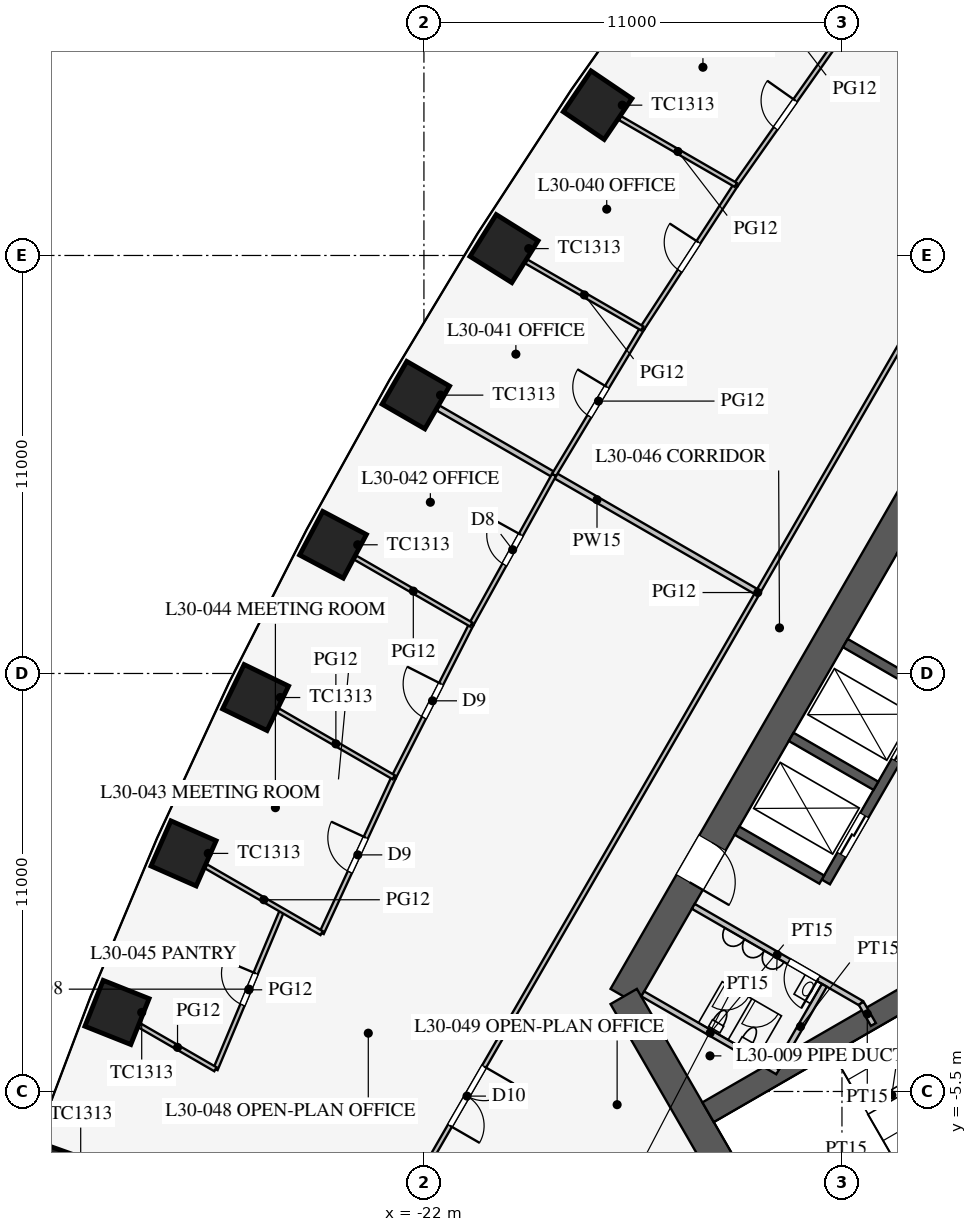
"""IFC4 building model, lengths in metres.
Left out: names, types, materials, properties, quantities, classifications, styles, units other than length and angle.
Written with IfcOpenShell. Run it as: python <this file> out.ifc"""

import sys

from ifc_helpers import new_model, si_unit, direction, frame, frame_2d, origin, origin_2d, place, context, subcontext, project, spatial, rectangle, extrude, element, fill, save


model = new_model("IFC4")
c1 = context("Model", 3, precision=1e-05, world=origin(), true_north=direction((0.0, 1.0)))
c2 = subcontext(c1, "Body", "Model", "MODEL_VIEW")
j1 = project(units=[si_unit("LENGTHUNIT", "METRE"), si_unit("PLANEANGLEUNIT", "RADIAN")], contexts=[c1])
p1 = place(None, origin())
s1 = spatial("IfcSite", under=j1, at=p1, CompositionType="ELEMENT")
p2 = place(p1, origin())
s2 = spatial("IfcBuilding", under=s1, at=p2, CompositionType="ELEMENT")
p3 = place(p2, frame((0.0, 0.0, 132.5)))
s3 = spatial("IfcBuildingStorey", under=s2, at=p3, CompositionType="ELEMENT", Elevation=132.5)
for number, where, z_axis, x_axis in (
    (1, (-17.43, 20.456, 0.0), (0.0, 0.0, 1.0), (-0.561, -0.828, 0.0)),
    (2, (-19.893, 16.681, 0.0), (0.0, 0.0, 1.0), (-0.531, -0.847, 0.0)),
    (3, (-22.213, 12.825, 0.0), (0.0, 0.0, 1.0), (-0.5, -0.866, 0.0)),
    (4, (-24.393, 8.887, 0.0), (0.0, 0.0, 1.0), (-0.468, -0.883, 0.0)),
    (5, (-26.43, 4.867, 0.0), (0.0, 0.0, 1.0), (-0.436, -0.9, 0.0)),
    (6, (-28.325, 0.765, 0.0), (0.0, 0.0, 1.0), (-0.403, -0.915, 0.0)),
    (7, (-30.077, -3.42, 0.0), (0.0, 0.0, 1.0), (-0.37, -0.929, 0.0)),
    (8, (-31.682, -7.689, 0.0), (0.0, 0.0, 1.0), (-0.336, -0.942, 0.0)),
):
    element("IfcColumn", number, at=place(p3, frame(where, z_axis=z_axis, x_axis=x_axis)), inside=s3, PredefinedType="COLUMN", context=c2, shape_type="SweptSolid", body=[
        extrude(rectangle(XDim=1.3, YDim=1.3, at=origin_2d()), origin(), (0.0, 0.0, 1.0), 4.2),
    ])
p4 = place(p3, frame((-5.773, 16.0, 0.0), z_axis=(0.0, 0.0, 1.0), x_axis=(-0.500002442456, -0.866023993627, 0.0)))
e9 = element("IfcWall", 9, at=p4, inside=s3, PredefinedType="SHEAR", context=c2, shape_type="SweptSolid", body=[
    extrude(rectangle(XDim=21.939, YDim=0.8, at=frame_2d((10.97, 0.0))), origin(), (0.0, 0.0, 1.0), 4.2),
])
p5 = place(p4, frame((17.27, 0.0, 0.0)))
e10 = element("IfcOpeningElement", 10, at=p5, cuts=e9, PredefinedType="OPENING", context=c2, shape_type="SweptSolid", body=[
    extrude(rectangle(XDim=1.2, YDim=2.1, at=frame_2d((0.6, 1.05))), frame((0.0, 0.41, 0.0), z_axis=(0.0, -1.0, 0.0), x_axis=(1.0, 0.0, 0.0)), (0.0, 0.0, 1.0), 0.82),
])
p6 = place(p4, frame((3.47, 0.0, 0.0)))
e11 = element("IfcOpeningElement", 11, at=p6, cuts=e9, PredefinedType="OPENING", context=c2, shape_type="SweptSolid", body=[
    extrude(rectangle(XDim=1.2, YDim=2.1, at=frame_2d((0.6, 1.05))), frame((0.0, 0.41, 0.0), z_axis=(0.0, -1.0, 0.0), x_axis=(1.0, 0.0, 0.0)), (0.0, 0.0, 1.0), 0.82),
])
p7 = place(p3, frame((-16.743, -3.0, 0.0), z_axis=(0.0, 0.0, 1.0), x_axis=(0.499995765644, -0.866027848477, 0.0)))
e12 = element("IfcWall", 12, at=p7, inside=s3, PredefinedType="SHEAR", context=c2, shape_type="SweptSolid", body=[
    extrude(rectangle(XDim=11.547, YDim=0.8, at=frame_2d((5.773, 0.0))), origin(), (0.0, 0.0, 1.0), 4.2),
])
p8 = place(p3, frame((-5.724, 9.886, 0.0), z_axis=(0.0, 0.0, 1.0), x_axis=(-0.500001763848, -0.866024385424, 0.0)))
e13 = element("IfcWall", 13, at=p8, inside=s3, PredefinedType="SHEAR", context=c2, shape_type="SweptSolid", body=[
    extrude(rectangle(XDim=11.4, YDim=0.25, at=frame_2d((5.7, 0.0))), origin(), (0.0, 0.0, 1.0), 4.2),
])
p9 = place(p8, frame((6.525, 0.0, 0.0)))
e14 = element("IfcOpeningElement", 14, at=p9, cuts=e13, PredefinedType="OPENING", context=c2, shape_type="SweptSolid", body=[
    extrude(rectangle(XDim=1.2, YDim=2.2, at=frame_2d((0.6, 1.1))), frame((0.0, 0.135, 0.0), z_axis=(0.0, -1.0, 0.0), x_axis=(1.0, 0.0, 0.0)), (0.0, 0.0, 1.0), 0.27),
])
p10 = place(p8, frame((9.375, 0.0, 0.0)))
e15 = element("IfcOpeningElement", 15, at=p10, cuts=e13, PredefinedType="OPENING", context=c2, shape_type="SweptSolid", body=[
    extrude(rectangle(XDim=1.2, YDim=2.2, at=frame_2d((0.6, 1.1))), frame((0.0, 0.135, 0.0), z_axis=(0.0, -1.0, 0.0), x_axis=(1.0, 0.0, 0.0)), (0.0, 0.0, 1.0), 0.27),
])
for number, where, z_axis, x_axis in (
    (16, (-7.257, 7.481, 0.0), (0.0, 0.0, 1.0), (-0.866, 0.5, 0.0)),
    (17, (-8.682, 5.012, 0.0), (0.0, 0.0, 1.0), (-0.866, 0.5, 0.0)),
    (18, (-10.107, 2.544, 0.0), (0.0, 0.0, 1.0), (-0.866, 0.5, 0.0)),
    (19, (-11.532, 0.076, 0.0), (0.0, 0.0, 1.0), (-0.866, 0.5, 0.0)),
):
    element("IfcWall", number, at=place(p3, frame(where, z_axis=z_axis, x_axis=x_axis)), inside=s3, PredefinedType="SHEAR", context=c2, shape_type="SweptSolid", body=[
        extrude(rectangle(XDim=2.575, YDim=0.25, at=frame_2d((1.288, 0.0))), origin(), (0.0, 0.0, 1.0), 4.2),
    ])
for number, where, z_axis, x_axis in (
    (20, (-6.663, -1.509, 0.0), (0.0, 0.0, 1.0), (-0.866, -0.5, 0.0)),
    (21, (-4.638, -5.016, 0.0), (0.0, 0.0, 1.0), (-0.866, -0.5, 0.0)),
):
    element("IfcWall", number, at=place(p3, frame(where, z_axis=z_axis, x_axis=x_axis)), inside=s3, PredefinedType="SHEAR", context=c2, shape_type="SweptSolid", body=[
        extrude(rectangle(XDim=9.075, YDim=0.6, at=frame_2d((4.538, 0.0))), origin(), (0.0, 0.0, 1.0), 4.2),
    ])
p11 = place(p3, frame((-10.495, -3.178, 0.0), z_axis=(0.0, 0.0, 1.0), x_axis=(-0.86602216432, 0.500005610874, 0.0)))
e22 = element("IfcWall", 22, at=p11, inside=s3, PredefinedType="PARTITIONING", context=c2, shape_type="SweptSolid", body=[
    extrude(rectangle(XDim=5.1, YDim=0.15, at=frame_2d((2.55, 0.0))), origin(), (0.0, 0.0, 1.0), 4.0),
])
p12 = place(p11, frame((1.3, 0.0, 0.0)))
e23 = element("IfcOpeningElement", 23, at=p12, cuts=e22, PredefinedType="OPENING", context=c2, shape_type="SweptSolid", body=[
    extrude(rectangle(XDim=0.9, YDim=2.1, at=frame_2d((0.45, 1.05))), frame((0.0, 0.085, 0.0), z_axis=(0.0, -1.0, 0.0), x_axis=(1.0, 0.0, 0.0)), (0.0, 0.0, 1.0), 0.17),
])
p13 = place(p3, frame((-10.495, -3.178, 0.0), z_axis=(0.0, 0.0, 1.0), x_axis=(0.499842556608, -0.866116284689, 0.0)))
e24 = element("IfcWall", 24, at=p13, inside=s3, PredefinedType="PARTITIONING", context=c2, shape_type="SweptSolid", body=[
    extrude(rectangle(XDim=0.645, YDim=0.15, at=frame_2d((0.323, 0.0))), origin(), (0.0, 0.0, 1.0), 4.0),
])
p14 = place(p3, frame((-12.691, -4.982, 0.0), z_axis=(0.0, 0.0, 1.0), x_axis=(-0.8660249478, 0.500000789788, 0.0)))
e25 = element("IfcWall", 25, at=p14, inside=s3, PredefinedType="PARTITIONING", context=c2, shape_type="SweptSolid", body=[
    extrude(rectangle(XDim=4.1, YDim=0.15, at=frame_2d((2.05, 0.0))), origin(), (0.0, 0.0, 1.0), 4.0),
])
p15 = place(p3, frame((-11.464, -2.706, 0.0), z_axis=(0.0, 0.0, 1.0), x_axis=(-0.50001992892, -0.866013897511, 0.0)))
e26 = element("IfcWall", 26, at=p15, inside=s3, PredefinedType="PARTITIONING", context=c2, shape_type="SweptSolid", body=[
    extrude(rectangle(XDim=2.51, YDim=0.15, at=frame_2d((1.255, 0.0))), origin(), (0.0, 0.0, 1.0), 4.0),
])
p16 = place(p3, frame((-13.268, 7.66, 0.0), z_axis=(0.0, 0.0, 1.0), x_axis=(-0.866015788683, 0.500016653474, 0.0)))
e27 = element("IfcWall", 27, at=p16, inside=s3, PredefinedType="PARTITIONING", context=c2, shape_type="SweptSolid", body=[
    extrude(rectangle(XDim=9.65, YDim=0.15, at=frame_2d((4.825, 0.0))), origin(), (0.0, 0.0, 1.0), 3.2),
])
p17 = place(p3, frame((-0.016, 30.491, 0.0), z_axis=(0.0, 0.0, 1.0), x_axis=(-0.50000091641, -0.866024874695, 0.0)))
e28 = element("IfcWall", 28, at=p17, inside=s3, PredefinedType="PARTITIONING", context=c2, shape_type="SweptSolid", body=[
    extrude(rectangle(XDim=52.796, YDim=0.12, at=frame_2d((26.398, 0.0))), origin(), (0.0, 0.0, 1.0), 2.9),
])
p18 = place(p17, frame((10.2, 0.0, 0.15)))
e29 = element("IfcOpeningElement", 29, at=p18, cuts=e28, PredefinedType="OPENING", context=c2, shape_type="SweptSolid", body=[
    extrude(rectangle(XDim=1.8, YDim=2.1, at=frame_2d((0.9, 1.05))), frame((0.0, 0.07, 0.0), z_axis=(0.0, -1.0, 0.0), x_axis=(1.0, 0.0, 0.0)), (0.0, 0.0, 1.0), 0.14),
])
p19 = place(p17, frame((40.8, 0.0, 0.15)))
e30 = element("IfcOpeningElement", 30, at=p19, cuts=e28, PredefinedType="OPENING", context=c2, shape_type="SweptSolid", body=[
    extrude(rectangle(XDim=1.8, YDim=2.1, at=frame_2d((0.9, 1.05))), frame((0.0, 0.07, 0.0), z_axis=(0.0, -1.0, 0.0), x_axis=(1.0, 0.0, 0.0)), (0.0, 0.0, 1.0), 0.14),
])
p20 = place(p3, frame((-18.576, 10.725, 0.0), z_axis=(0.0, 0.0, 1.0), x_axis=(-0.484292898211, -0.874905931368, 0.0)))
e31 = element("IfcWall", 31, at=p20, inside=s3, PredefinedType="PARTITIONING", context=c2, shape_type="SweptSolid", body=[
    extrude(rectangle(XDim=4.501, YDim=0.12, at=frame_2d((2.25, 0.0))), origin(), (0.0, 0.0, 1.0), 2.9),
])
p21 = place(p20, frame((1.8, 0.0, 0.15)))
e32 = element("IfcOpeningElement", 32, at=p21, cuts=e31, PredefinedType="OPENING", context=c2, shape_type="SweptSolid", body=[
    extrude(rectangle(XDim=0.9, YDim=2.1, at=frame_2d((0.45, 1.05))), frame((0.0, 0.07, 0.0), z_axis=(0.0, -1.0, 0.0), x_axis=(1.0, 0.0, 0.0)), (0.0, 0.0, 1.0), 0.14),
])
p22 = place(p3, frame((-25.731, -0.732, 0.0), z_axis=(0.0, 0.0, 1.0), x_axis=(-0.386742917128, -0.92218757097, 0.0)))
e33 = element("IfcWall", 33, at=p22, inside=s3, PredefinedType="PARTITIONING", context=c2, shape_type="SweptSolid", body=[
    extrude(rectangle(XDim=4.536, YDim=0.12, at=frame_2d((2.268, 0.0))), origin(), (0.0, 0.0, 1.0), 2.9),
])
p23 = place(p22, frame((1.8, 0.0, 0.15)))
e34 = element("IfcOpeningElement", 34, at=p23, cuts=e33, PredefinedType="OPENING", context=c2, shape_type="SweptSolid", body=[
    extrude(rectangle(XDim=0.9, YDim=2.1, at=frame_2d((0.45, 1.05))), frame((0.0, 0.07, 0.0), z_axis=(0.0, -1.0, 0.0), x_axis=(1.0, 0.0, 0.0)), (0.0, 0.0, 1.0), 0.14),
])
p24 = place(p3, frame((-20.756, 6.787, 0.0), z_axis=(0.0, 0.0, 1.0), x_axis=(-0.452471679136, -0.891778772779, 0.0)))
e35 = element("IfcWall", 35, at=p24, inside=s3, PredefinedType="PARTITIONING", context=c2, shape_type="SweptSolid", body=[
    extrude(rectangle(XDim=4.507, YDim=0.12, at=frame_2d((2.253, 0.0))), origin(), (0.0, 0.0, 1.0), 2.9),
])
p25 = place(p24, frame((1.75, 0.0, 0.15)))
e36 = element("IfcOpeningElement", 36, at=p25, cuts=e35, PredefinedType="OPENING", context=c2, shape_type="SweptSolid", body=[
    extrude(rectangle(XDim=1.0, YDim=2.1, at=frame_2d((0.5, 1.05))), frame((0.0, 0.07, 0.0), z_axis=(0.0, -1.0, 0.0), x_axis=(1.0, 0.0, 0.0)), (0.0, 0.0, 1.0), 0.14),
])
p26 = place(p3, frame((-22.795, 2.768, 0.0), z_axis=(0.0, 0.0, 1.0), x_axis=(-0.41992827805, -0.90755729367, 0.0)))
e37 = element("IfcWall", 37, at=p26, inside=s3, PredefinedType="PARTITIONING", context=c2, shape_type="SweptSolid", body=[
    extrude(rectangle(XDim=4.519, YDim=0.12, at=frame_2d((2.259, 0.0))), origin(), (0.0, 0.0, 1.0), 2.9),
])
p27 = place(p26, frame((1.75, 0.0, 0.15)))
e38 = element("IfcOpeningElement", 38, at=p27, cuts=e37, PredefinedType="OPENING", context=c2, shape_type="SweptSolid", body=[
    extrude(rectangle(XDim=1.0, YDim=2.1, at=frame_2d((0.5, 1.05))), frame((0.0, 0.07, 0.0), z_axis=(0.0, -1.0, 0.0), x_axis=(1.0, 0.0, 0.0)), (0.0, 0.0, 1.0), 0.14),
])
p28 = place(p3, frame((-11.192, 22.05, 0.0), z_axis=(0.0, 0.0, 1.0), x_axis=(-0.575987178736, -0.817458726745, 0.0)))
e39 = element("IfcWall", 39, at=p28, inside=s3, PredefinedType="PARTITIONING", context=c2, shape_type="SweptSolid", body=[
    extrude(rectangle(XDim=4.518, YDim=0.12, at=frame_2d((2.259, 0.0))), origin(), (0.0, 0.0, 1.0), 2.9),
])
p29 = place(p28, frame((1.8, 0.0, 0.15)))
e40 = element("IfcOpeningElement", 40, at=p29, cuts=e39, PredefinedType="OPENING", context=c2, shape_type="SweptSolid", body=[
    extrude(rectangle(XDim=0.9, YDim=2.1, at=frame_2d((0.45, 1.05))), frame((0.0, 0.07, 0.0), z_axis=(0.0, -1.0, 0.0), x_axis=(1.0, 0.0, 0.0)), (0.0, 0.0, 1.0), 0.14),
])
p30 = place(p3, frame((-16.256, 14.581, 0.0), z_axis=(0.0, 0.0, 1.0), x_axis=(-0.515548366618, -0.856860479703, 0.0)))
e41 = element("IfcWall", 41, at=p30, inside=s3, PredefinedType="PARTITIONING", context=c2, shape_type="SweptSolid", body=[
    extrude(rectangle(XDim=4.501, YDim=0.12, at=frame_2d((2.25, 0.0))), origin(), (0.0, 0.0, 1.0), 2.9),
])
p31 = place(p30, frame((1.8, 0.0, 0.15)))
e42 = element("IfcOpeningElement", 42, at=p31, cuts=e41, PredefinedType="OPENING", context=c2, shape_type="SweptSolid", body=[
    extrude(rectangle(XDim=0.9, YDim=2.1, at=frame_2d((0.45, 1.05))), frame((0.0, 0.07, 0.0), z_axis=(0.0, -1.0, 0.0), x_axis=(1.0, 0.0, 0.0)), (0.0, 0.0, 1.0), 0.14),
])
p32 = place(p3, frame((-13.795, 18.357, 0.0), z_axis=(0.0, 0.0, 1.0), x_axis=(-0.546069464151, -0.837739900161, 0.0)))
e43 = element("IfcWall", 43, at=p32, inside=s3, PredefinedType="PARTITIONING", context=c2, shape_type="SweptSolid", body=[
    extrude(rectangle(XDim=4.507, YDim=0.12, at=frame_2d((2.253, 0.0))), origin(), (0.0, 0.0, 1.0), 2.9),
])
p33 = place(p32, frame((1.8, 0.0, 0.15)))
e44 = element("IfcOpeningElement", 44, at=p33, cuts=e43, PredefinedType="OPENING", context=c2, shape_type="SweptSolid", body=[
    extrude(rectangle(XDim=0.9, YDim=2.1, at=frame_2d((0.45, 1.05))), frame((0.0, 0.07, 0.0), z_axis=(0.0, -1.0, 0.0), x_axis=(1.0, 0.0, 0.0)), (0.0, 0.0, 1.0), 0.14),
])
p34 = place(p3, frame((-24.692, -1.333, 0.0), z_axis=(0.0, 0.0, 1.0), x_axis=(-0.86600959659, 0.500027377864, 0.0)))
e45 = element("IfcWall", 45, at=p34, inside=s3, PredefinedType="PARTITIONING", context=c2, shape_type="SweptSolid", body=[
    extrude(rectangle(XDim=3.511, YDim=0.12, at=frame_2d((1.756, 0.0))), origin(), (0.0, 0.0, 1.0), 2.9),
])
p35 = place(p3, frame((-27.486, -4.916, 0.0), z_axis=(0.0, 0.0, 1.0), x_axis=(-0.865991504495, 0.500058710695, 0.0)))
e46 = element("IfcWall", 46, at=p35, inside=s3, PredefinedType="PARTITIONING", context=c2, shape_type="SweptSolid", body=[
    extrude(rectangle(XDim=2.304, YDim=0.12, at=frame_2d((1.152, 0.0))), origin(), (0.0, 0.0, 1.0), 2.9),
])
p36 = place(p3, frame((-20.756, 6.787, 0.0), z_axis=(0.0, 0.0, 1.0), x_axis=(-0.866027308682, 0.499996700606, 0.0)))
e47 = element("IfcWall", 47, at=p36, inside=s3, PredefinedType="PARTITIONING", context=c2, shape_type="SweptSolid", body=[
    extrude(rectangle(XDim=3.519, YDim=0.12, at=frame_2d((1.76, 0.0))), origin(), (0.0, 0.0, 1.0), 2.9),
])
p37 = place(p3, frame((-22.795, 2.768, 0.0), z_axis=(0.0, 0.0, 1.0), x_axis=(-0.866034119795, 0.499984903122, 0.0)))
e48 = element("IfcWall", 48, at=p37, inside=s3, PredefinedType="PARTITIONING", context=c2, shape_type="SweptSolid", body=[
    extrude(rectangle(XDim=3.516, YDim=0.12, at=frame_2d((1.758, 0.0))), origin(), (0.0, 0.0, 1.0), 2.9),
])
p38 = place(p3, frame((-16.256, 14.581, 0.0), z_axis=(0.0, 0.0, 1.0), x_axis=(-0.866027308682, 0.499996700606, 0.0)))
e49 = element("IfcWall", 49, at=p38, inside=s3, PredefinedType="PARTITIONING", context=c2, shape_type="SweptSolid", body=[
    extrude(rectangle(XDim=3.519, YDim=0.12, at=frame_2d((1.76, 0.0))), origin(), (0.0, 0.0, 1.0), 2.9),
])
p39 = place(p3, frame((-13.795, 18.357, 0.0), z_axis=(0.0, 0.0, 1.0), x_axis=(-0.866034119795, 0.499984903122, 0.0)))
e50 = element("IfcWall", 50, at=p39, inside=s3, PredefinedType="PARTITIONING", context=c2, shape_type="SweptSolid", body=[
    extrude(rectangle(XDim=3.516, YDim=0.12, at=frame_2d((1.758, 0.0))), origin(), (0.0, 0.0, 1.0), 2.9),
])
p40 = place(p12, origin())
e51 = element("IfcDoor", 51, at=p40, inside=s3, OperationType="SINGLE_SWING_LEFT", PredefinedType="DOOR", context=c2, shape_type="SweptSolid", body=[
    extrude(rectangle(XDim=0.9, YDim=2.1, at=frame_2d((0.45, 1.05))), frame((0.0, 0.025, 0.0), z_axis=(0.0, -1.0, 0.0), x_axis=(1.0, 0.0, 0.0)), (0.0, 0.0, 1.0), 0.05),
])
fill(e23, e51)
p41 = place(p5, origin())
e52 = element("IfcDoor", 52, at=p41, inside=s3, OperationType="SINGLE_SWING_RIGHT", PredefinedType="DOOR", context=c2, shape_type="SweptSolid", body=[
    extrude(rectangle(XDim=1.2, YDim=2.1, at=frame_2d((0.6, 1.05))), frame((0.0, 0.025, 0.0), z_axis=(0.0, -1.0, 0.0), x_axis=(1.0, 0.0, 0.0)), (0.0, 0.0, 1.0), 0.05),
])
fill(e10, e52)
p42 = place(p29, frame((0.9, 0.0, 0.0), z_axis=(0.0, 0.0, 1.0), x_axis=(-1.0, 0.0, 0.0)))
e53 = element("IfcDoor", 53, at=p42, inside=s3, OperationType="SINGLE_SWING_RIGHT", PredefinedType="DOOR", context=c2, shape_type="SweptSolid", body=[
    extrude(rectangle(XDim=0.9, YDim=2.1, at=frame_2d((0.45, 1.05))), frame((0.0, 0.025, 0.0), z_axis=(0.0, -1.0, 0.0), x_axis=(1.0, 0.0, 0.0)), (0.0, 0.0, 1.0), 0.05),
])
fill(e40, e53)
p43 = place(p33, frame((0.9, 0.0, 0.0), z_axis=(0.0, 0.0, 1.0), x_axis=(-1.0, 0.0, 0.0)))
e54 = element("IfcDoor", 54, at=p43, inside=s3, OperationType="SINGLE_SWING_RIGHT", PredefinedType="DOOR", context=c2, shape_type="SweptSolid", body=[
    extrude(rectangle(XDim=0.9, YDim=2.1, at=frame_2d((0.45, 1.05))), frame((0.0, 0.025, 0.0), z_axis=(0.0, -1.0, 0.0), x_axis=(1.0, 0.0, 0.0)), (0.0, 0.0, 1.0), 0.05),
])
fill(e44, e54)
p44 = place(p31, frame((0.9, 0.0, 0.0), z_axis=(0.0, 0.0, 1.0), x_axis=(-1.0, 0.0, 0.0)))
e55 = element("IfcDoor", 55, at=p44, inside=s3, OperationType="SINGLE_SWING_RIGHT", PredefinedType="DOOR", context=c2, shape_type="SweptSolid", body=[
    extrude(rectangle(XDim=0.9, YDim=2.1, at=frame_2d((0.45, 1.05))), frame((0.0, 0.025, 0.0), z_axis=(0.0, -1.0, 0.0), x_axis=(1.0, 0.0, 0.0)), (0.0, 0.0, 1.0), 0.05),
])
fill(e42, e55)
p45 = place(p21, frame((0.9, 0.0, 0.0), z_axis=(0.0, 0.0, 1.0), x_axis=(-1.0, 0.0, 0.0)))
e56 = element("IfcDoor", 56, at=p45, inside=s3, OperationType="SINGLE_SWING_RIGHT", PredefinedType="DOOR", context=c2, shape_type="SweptSolid", body=[
    extrude(rectangle(XDim=0.9, YDim=2.1, at=frame_2d((0.45, 1.05))), frame((0.0, 0.025, 0.0), z_axis=(0.0, -1.0, 0.0), x_axis=(1.0, 0.0, 0.0)), (0.0, 0.0, 1.0), 0.05),
])
fill(e32, e56)
p46 = place(p25, frame((1.0, 0.0, 0.0), z_axis=(0.0, 0.0, 1.0), x_axis=(-1.0, 0.0, 0.0)))
e57 = element("IfcDoor", 57, at=p46, inside=s3, OperationType="SINGLE_SWING_RIGHT", PredefinedType="DOOR", context=c2, shape_type="SweptSolid", body=[
    extrude(rectangle(XDim=1.0, YDim=2.1, at=frame_2d((0.5, 1.05))), frame((0.0, 0.025, 0.0), z_axis=(0.0, -1.0, 0.0), x_axis=(1.0, 0.0, 0.0)), (0.0, 0.0, 1.0), 0.05),
])
fill(e36, e57)
p47 = place(p27, frame((1.0, 0.0, 0.0), z_axis=(0.0, 0.0, 1.0), x_axis=(-1.0, 0.0, 0.0)))
e58 = element("IfcDoor", 58, at=p47, inside=s3, OperationType="SINGLE_SWING_RIGHT", PredefinedType="DOOR", context=c2, shape_type="SweptSolid", body=[
    extrude(rectangle(XDim=1.0, YDim=2.1, at=frame_2d((0.5, 1.05))), frame((0.0, 0.025, 0.0), z_axis=(0.0, -1.0, 0.0), x_axis=(1.0, 0.0, 0.0)), (0.0, 0.0, 1.0), 0.05),
])
fill(e38, e58)
p48 = place(p23, frame((0.9, 0.0, 0.0), z_axis=(0.0, 0.0, 1.0), x_axis=(-1.0, 0.0, 0.0)))
e59 = element("IfcDoor", 59, at=p48, inside=s3, OperationType="SINGLE_SWING_RIGHT", PredefinedType="DOOR", context=c2, shape_type="SweptSolid", body=[
    extrude(rectangle(XDim=0.9, YDim=2.1, at=frame_2d((0.45, 1.05))), frame((0.0, 0.025, 0.0), z_axis=(0.0, -1.0, 0.0), x_axis=(1.0, 0.0, 0.0)), (0.0, 0.0, 1.0), 0.05),
])
fill(e34, e59)
p49 = place(p19, origin())
e60 = element("IfcDoor", 60, at=p49, inside=s3, OperationType="DOUBLE_DOOR_SINGLE_SWING", PredefinedType="DOOR", context=c2, shape_type="SweptSolid", body=[
    extrude(rectangle(XDim=1.8, YDim=2.1, at=frame_2d((0.9, 1.05))), frame((0.0, 0.025, 0.0), z_axis=(0.0, -1.0, 0.0), x_axis=(1.0, 0.0, 0.0)), (0.0, 0.0, 1.0), 0.05),
])
fill(e30, e60)
p50 = place(p9, origin())
e61 = element("IfcDoor", 61, at=p50, inside=s3, OperationType="DOUBLE_DOOR_SLIDING", PredefinedType="DOOR", context=c2, shape_type="SweptSolid", body=[
    extrude(rectangle(XDim=1.2, YDim=2.2, at=frame_2d((0.6, 1.1))), frame((0.0, 0.025, 0.0), z_axis=(0.0, -1.0, 0.0), x_axis=(1.0, 0.0, 0.0)), (0.0, 0.0, 1.0), 0.05),
])
fill(e14, e61)
p51 = place(p10, origin())
e62 = element("IfcDoor", 62, at=p51, inside=s3, OperationType="DOUBLE_DOOR_SLIDING", PredefinedType="DOOR", context=c2, shape_type="SweptSolid", body=[
    extrude(rectangle(XDim=1.2, YDim=2.2, at=frame_2d((0.6, 1.1))), frame((0.0, 0.025, 0.0), z_axis=(0.0, -1.0, 0.0), x_axis=(1.0, 0.0, 0.0)), (0.0, 0.0, 1.0), 0.05),
])
fill(e15, e62)
save(model, sys.argv[1])
